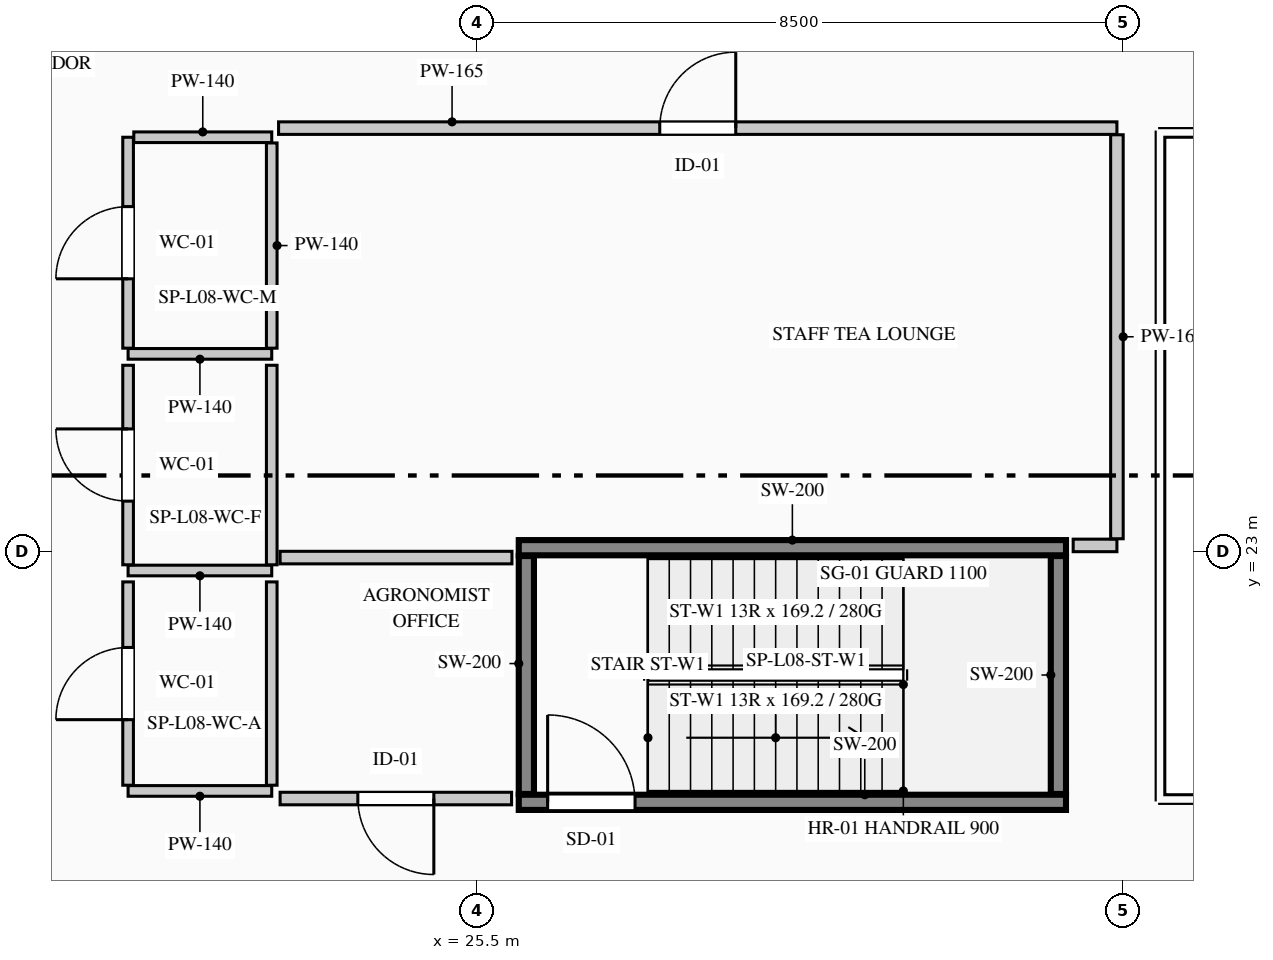
"""IFC4 building model, lengths in metres.
Left out: names, types, materials, properties, quantities, classifications, styles, units other than length and angle.
Written with IfcOpenShell. Run it as: python <this file> out.ifc"""

import sys

from ifc_helpers import new_model, si_unit, direction, frame, frame_2d, origin, place, context, subcontext, project, spatial, rectangle, extrude, element, fill, save


model = new_model("IFC4")
c1 = context("Model", 3, precision=1e-05, world=origin(), true_north=direction((0.0, 1.0)))
c2 = subcontext(c1, "Body", "Model", "MODEL_VIEW")
j1 = project(units=[si_unit("LENGTHUNIT", "METRE"), si_unit("PLANEANGLEUNIT", "RADIAN")], contexts=[c1])
p1 = place(None, origin())
s1 = spatial("IfcSite", under=j1, at=p1, CompositionType="ELEMENT")
p2 = place(p1, origin())
s2 = spatial("IfcBuilding", under=s1, at=p2, CompositionType="ELEMENT")
p3 = place(p2, frame((0.0, 0.0, 35.8)))
s3 = spatial("IfcBuildingStorey", under=s2, at=p3, CompositionType="ELEMENT", Elevation=35.8)
p4 = place(p3, frame((26.05, 19.7, 0.0), z_axis=(0.0, 0.0, 1.0), x_axis=(1.0, 0.0, 0.0)))
e1 = element("IfcWall", 1, at=p4, inside=s3, PredefinedType="SHEAR", context=c2, shape_type="SweptSolid", body=[
    extrude(rectangle(XDim=7.2, YDim=0.2, at=frame_2d((3.6, 0.0))), origin(), (0.0, 0.0, 1.0), 4.4),
])
p5 = place(p4, frame((0.38, 0.0, 0.0)))
e2 = element("IfcOpeningElement", 2, at=p5, cuts=e1, PredefinedType="OPENING", context=c2, shape_type="SweptSolid", body=[
    extrude(rectangle(XDim=1.15, YDim=2.2, at=frame_2d((0.575, 1.1))), frame((0.0, 0.11, 0.0), z_axis=(0.0, -1.0, 0.0), x_axis=(1.0, 0.0, 0.0)), (0.0, 0.0, 1.0), 0.22),
])
p6 = place(p3, frame((26.05, 23.05, 0.0), z_axis=(0.0, 0.0, 1.0), x_axis=(1.0, 0.0, 0.0)))
e3 = element("IfcWall", 3, at=p6, inside=s3, PredefinedType="SHEAR", context=c2, shape_type="SweptSolid", body=[
    extrude(rectangle(XDim=7.2, YDim=0.2, at=frame_2d((3.6, 0.0))), origin(), (0.0, 0.0, 1.0), 4.4),
])
for number, where, z_axis, x_axis in (
    (4, (26.15, 19.81, 0.0), (0.0, 0.0, 1.0), (0.0, 1.0, 0.0)),
    (5, (33.15, 19.81, 0.0), (0.0, 0.0, 1.0), (0.0, 1.0, 0.0)),
):
    element("IfcWall", number, at=place(p3, frame(where, z_axis=z_axis, x_axis=x_axis)), inside=s3, PredefinedType="SHEAR", context=c2, shape_type="SweptSolid", body=[
        extrude(rectangle(XDim=3.13, YDim=0.2, at=frame_2d((1.565, 0.0))), origin(), (0.0, 0.0, 1.0), 4.4),
    ])
p7 = place(p3, frame((22.8, 25.6, 0.0), z_axis=(0.0, 0.0, 1.0), x_axis=(-1.0, 0.0, 0.0)))
e6 = element("IfcWall", 6, at=p7, inside=s3, PredefinedType="PARTITIONING", context=c2, shape_type="SweptSolid", body=[
    extrude(rectangle(XDim=1.89, YDim=0.14, at=frame_2d((0.945, 0.0))), origin(), (0.0, 0.0, 1.0), 4.1),
])
p8 = place(p3, frame((20.91, 25.675, 0.0), z_axis=(0.0, 0.0, 1.0), x_axis=(0.0, 1.0, 0.0)))
e7 = element("IfcWall", 7, at=p8, inside=s3, PredefinedType="PARTITIONING", context=c2, shape_type="SweptSolid", body=[
    extrude(rectangle(XDim=2.775, YDim=0.14, at=frame_2d((1.387, 0.0))), origin(), (0.0, 0.0, 1.0), 4.1),
])
p9 = place(p8, frame((0.913, 0.0, 0.0)))
e8 = element("IfcOpeningElement", 8, at=p9, cuts=e7, PredefinedType="OPENING", context=c2, shape_type="SweptSolid", body=[
    extrude(rectangle(XDim=0.95, YDim=2.15, at=frame_2d((0.475, 1.075))), frame((0.0, 0.08, 0.0), z_axis=(0.0, -1.0, 0.0), x_axis=(1.0, 0.0, 0.0)), (0.0, 0.0, 1.0), 0.16),
])
p10 = place(p3, frame((20.985, 28.45, 0.0), z_axis=(0.0, 0.0, 1.0), x_axis=(1.0, 0.0, 0.0)))
e9 = element("IfcWall", 9, at=p10, inside=s3, PredefinedType="PARTITIONING", context=c2, shape_type="SweptSolid", body=[
    extrude(rectangle(XDim=1.815, YDim=0.14, at=frame_2d((0.907, 0.0))), origin(), (0.0, 0.0, 1.0), 4.1),
])
p11 = place(p3, frame((22.8, 28.375, 0.0), z_axis=(0.0, 0.0, 1.0), x_axis=(0.0, -1.0, 0.0)))
e10 = element("IfcWall", 10, at=p11, inside=s3, PredefinedType="PARTITIONING", context=c2, shape_type="SweptSolid", body=[
    extrude(rectangle(XDim=2.7, YDim=0.14, at=frame_2d((1.35, 0.0))), origin(), (0.0, 0.0, 1.0), 3.725),
])
p12 = place(p3, frame((22.8, 22.75, 0.0), z_axis=(0.0, 0.0, 1.0), x_axis=(-1.0, 0.0, 0.0)))
e11 = element("IfcWall", 11, at=p12, inside=s3, PredefinedType="PARTITIONING", context=c2, shape_type="SweptSolid", body=[
    extrude(rectangle(XDim=1.89, YDim=0.14, at=frame_2d((0.945, 0.0))), origin(), (0.0, 0.0, 1.0), 4.1),
])
p13 = place(p3, frame((20.91, 22.825, 0.0), z_axis=(0.0, 0.0, 1.0), x_axis=(0.0, 1.0, 0.0)))
e12 = element("IfcWall", 12, at=p13, inside=s3, PredefinedType="PARTITIONING", context=c2, shape_type="SweptSolid", body=[
    extrude(rectangle(XDim=2.625, YDim=0.14, at=frame_2d((1.312, 0.0))), origin(), (0.0, 0.0, 1.0), 4.1),
])
p14 = place(p13, frame((0.837, 0.0, 0.0)))
e13 = element("IfcOpeningElement", 13, at=p14, cuts=e12, PredefinedType="OPENING", context=c2, shape_type="SweptSolid", body=[
    extrude(rectangle(XDim=0.95, YDim=2.15, at=frame_2d((0.475, 1.075))), frame((0.0, 0.08, 0.0), z_axis=(0.0, -1.0, 0.0), x_axis=(1.0, 0.0, 0.0)), (0.0, 0.0, 1.0), 0.16),
])
p15 = place(p3, frame((22.8, 25.45, 0.0), z_axis=(0.0, 0.0, 1.0), x_axis=(0.0, -1.0, 0.0)))
e14 = element("IfcWall", 14, at=p15, inside=s3, PredefinedType="PARTITIONING", context=c2, shape_type="SweptSolid", body=[
    extrude(rectangle(XDim=2.625, YDim=0.14, at=frame_2d((1.312, 0.0))), origin(), (0.0, 0.0, 1.0), 3.725),
])
p16 = place(p3, frame((22.8, 19.85, 0.0), z_axis=(0.0, 0.0, 1.0), x_axis=(-1.0, 0.0, 0.0)))
e15 = element("IfcWall", 15, at=p16, inside=s3, PredefinedType="PARTITIONING", context=c2, shape_type="SweptSolid", body=[
    extrude(rectangle(XDim=1.89, YDim=0.14, at=frame_2d((0.945, 0.0))), origin(), (0.0, 0.0, 1.0), 4.1),
])
p17 = place(p3, frame((20.91, 19.925, 0.0), z_axis=(0.0, 0.0, 1.0), x_axis=(0.0, 1.0, 0.0)))
e16 = element("IfcWall", 16, at=p17, inside=s3, PredefinedType="PARTITIONING", context=c2, shape_type="SweptSolid", body=[
    extrude(rectangle(XDim=2.675, YDim=0.14, at=frame_2d((1.337, 0.0))), origin(), (0.0, 0.0, 1.0), 4.1),
])
p18 = place(p17, frame((0.863, 0.0, 0.0)))
e17 = element("IfcOpeningElement", 17, at=p18, cuts=e16, PredefinedType="OPENING", context=c2, shape_type="SweptSolid", body=[
    extrude(rectangle(XDim=0.95, YDim=2.15, at=frame_2d((0.475, 1.075))), frame((0.0, 0.08, 0.0), z_axis=(0.0, -1.0, 0.0), x_axis=(1.0, 0.0, 0.0)), (0.0, 0.0, 1.0), 0.16),
])
p19 = place(p3, frame((22.8, 22.6, 0.0), z_axis=(0.0, 0.0, 1.0), x_axis=(0.0, -1.0, 0.0)))
e18 = element("IfcWall", 18, at=p19, inside=s3, PredefinedType="PARTITIONING", context=c2, shape_type="SweptSolid", body=[
    extrude(rectangle(XDim=2.675, YDim=0.14, at=frame_2d((1.337, 0.0))), origin(), (0.0, 0.0, 1.0), 3.725),
])
p20 = place(p3, frame((25.956, 19.75, 0.0), z_axis=(0.0, 0.0, 1.0), x_axis=(-1.0, 0.0, 0.0)))
e19 = element("IfcWall", 19, at=p20, inside=s3, PredefinedType="PARTITIONING", context=c2, shape_type="SweptSolid", body=[
    extrude(rectangle(XDim=3.046, YDim=0.165, at=frame_2d((1.523, 0.0))), origin(), (0.0, 0.0, 1.0), 4.1),
])
p21 = place(p20, frame((1.023, 0.0, 0.0)))
e20 = element("IfcOpeningElement", 20, at=p21, cuts=e19, PredefinedType="OPENING", context=c2, shape_type="SweptSolid", body=[
    extrude(rectangle(XDim=1.0, YDim=2.15, at=frame_2d((0.5, 1.075))), frame((0.0, 0.093, 0.0), z_axis=(0.0, -1.0, 0.0), x_axis=(1.0, 0.0, 0.0)), (0.0, 0.0, 1.0), 0.185),
])
p22 = place(p3, frame((22.91, 22.92, 0.0), z_axis=(0.0, 0.0, 1.0), x_axis=(1.0, 0.0, 0.0)))
e21 = element("IfcWall", 21, at=p22, inside=s3, PredefinedType="PARTITIONING", context=c2, shape_type="SweptSolid", body=[
    extrude(rectangle(XDim=3.051, YDim=0.165, at=frame_2d((1.525, 0.0))), origin(), (0.0, 0.0, 1.0), 4.1),
])
p23 = place(p3, frame((33.92, 23.08, 0.0), z_axis=(0.0, 0.0, 1.0), x_axis=(-1.0, 0.0, 0.0)))
e22 = element("IfcWall", 22, at=p23, inside=s3, PredefinedType="PARTITIONING", context=c2, shape_type="SweptSolid", body=[
    extrude(rectangle(XDim=0.575, YDim=0.165, at=frame_2d((0.288, 0.0))), origin(), (0.0, 0.0, 1.0), 4.1),
])
p24 = place(p3, frame((22.89, 28.57, 0.0), z_axis=(0.0, 0.0, 1.0), x_axis=(1.0, 0.0, 0.0)))
e23 = element("IfcWall", 23, at=p24, inside=s3, PredefinedType="PARTITIONING", context=c2, shape_type="SweptSolid", body=[
    extrude(rectangle(XDim=11.03, YDim=0.165, at=frame_2d((5.515, 0.0))), origin(), (0.0, 0.0, 1.0), 3.885),
])
p25 = place(p24, frame((5.015, 0.0, 0.0)))
e24 = element("IfcOpeningElement", 24, at=p25, cuts=e23, PredefinedType="OPENING", context=c2, shape_type="SweptSolid", body=[
    extrude(rectangle(XDim=1.0, YDim=2.15, at=frame_2d((0.5, 1.075))), frame((0.0, 0.093, 0.0), z_axis=(0.0, -1.0, 0.0), x_axis=(1.0, 0.0, 0.0)), (0.0, 0.0, 1.0), 0.185),
])
p26 = place(p3, frame((33.92, 28.482, 0.0), z_axis=(0.0, 0.0, 1.0), x_axis=(0.0, -1.0, 0.0)))
e25 = element("IfcWall", 25, at=p26, inside=s3, PredefinedType="PARTITIONING", context=c2, shape_type="SweptSolid", body=[
    extrude(rectangle(XDim=5.315, YDim=0.165, at=frame_2d((2.657, 0.0))), origin(), (0.0, 0.0, 1.0), 3.285),
])
p27 = place(p5, origin())
e26 = element("IfcDoor", 26, at=p27, inside=s3, OperationType="SINGLE_SWING_LEFT", PredefinedType="DOOR", context=c2, shape_type="SweptSolid", body=[
    extrude(rectangle(XDim=1.15, YDim=2.2, at=frame_2d((0.575, 1.1))), frame((0.0, 0.025, 0.0), z_axis=(0.0, -1.0, 0.0), x_axis=(1.0, 0.0, 0.0)), (0.0, 0.0, 1.0), 0.05),
])
fill(e2, e26)
p28 = place(p9, origin())
e27 = element("IfcDoor", 27, at=p28, inside=s3, OperationType="SINGLE_SWING_LEFT", PredefinedType="DOOR", context=c2, shape_type="SweptSolid", body=[
    extrude(rectangle(XDim=0.95, YDim=2.15, at=frame_2d((0.475, 1.075))), frame((0.0, 0.025, 0.0), z_axis=(0.0, -1.0, 0.0), x_axis=(1.0, 0.0, 0.0)), (0.0, 0.0, 1.0), 0.05),
])
fill(e8, e27)
p29 = place(p14, origin())
e28 = element("IfcDoor", 28, at=p29, inside=s3, OperationType="SINGLE_SWING_RIGHT", PredefinedType="DOOR", context=c2, shape_type="SweptSolid", body=[
    extrude(rectangle(XDim=0.95, YDim=2.15, at=frame_2d((0.475, 1.075))), frame((0.0, 0.025, 0.0), z_axis=(0.0, -1.0, 0.0), x_axis=(1.0, 0.0, 0.0)), (0.0, 0.0, 1.0), 0.05),
])
fill(e13, e28)
p30 = place(p18, origin())
e29 = element("IfcDoor", 29, at=p30, inside=s3, OperationType="SINGLE_SWING_LEFT", PredefinedType="DOOR", context=c2, shape_type="SweptSolid", body=[
    extrude(rectangle(XDim=0.95, YDim=2.15, at=frame_2d((0.475, 1.075))), frame((0.0, 0.025, 0.0), z_axis=(0.0, -1.0, 0.0), x_axis=(1.0, 0.0, 0.0)), (0.0, 0.0, 1.0), 0.05),
])
fill(e17, e29)
p31 = place(p21, origin())
e30 = element("IfcDoor", 30, at=p31, inside=s3, OperationType="SINGLE_SWING_LEFT", PredefinedType="DOOR", context=c2, shape_type="SweptSolid", body=[
    extrude(rectangle(XDim=1.0, YDim=2.15, at=frame_2d((0.5, 1.075))), frame((0.0, 0.025, 0.0), z_axis=(0.0, -1.0, 0.0), x_axis=(1.0, 0.0, 0.0)), (0.0, 0.0, 1.0), 0.05),
])
fill(e20, e30)
p32 = place(p25, origin())
e31 = element("IfcDoor", 31, at=p32, inside=s3, OperationType="SINGLE_SWING_RIGHT", PredefinedType="DOOR", context=c2, shape_type="SweptSolid", body=[
    extrude(rectangle(XDim=1.0, YDim=2.15, at=frame_2d((0.5, 1.075))), frame((0.0, 0.025, 0.0), z_axis=(0.0, -1.0, 0.0), x_axis=(1.0, 0.0, 0.0)), (0.0, 0.0, 1.0), 0.05),
])
fill(e24, e31)
save(model, sys.argv[1])
